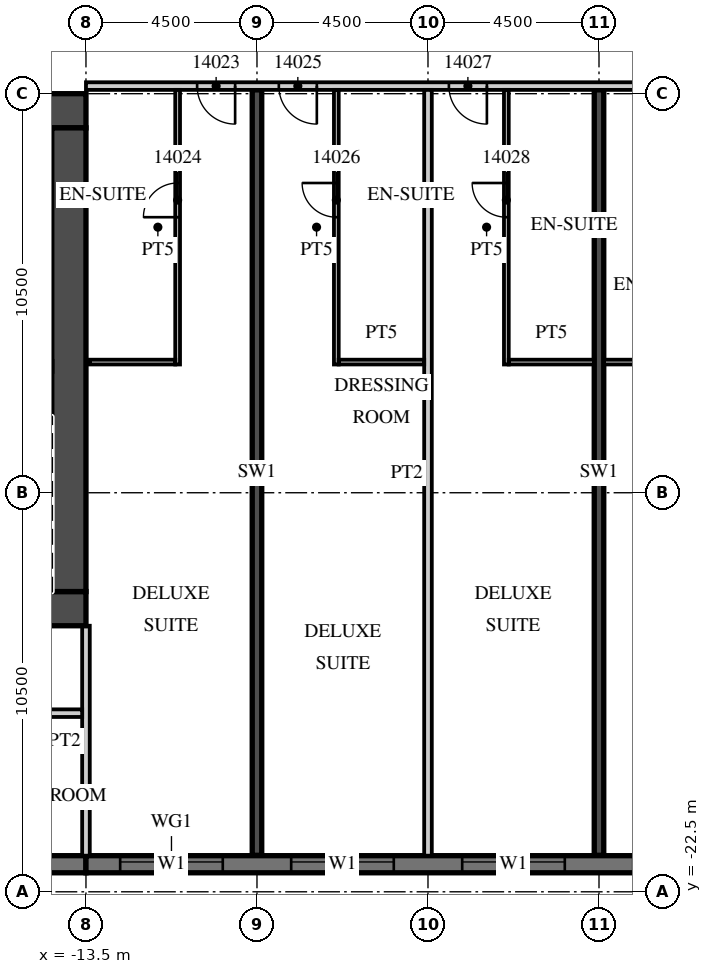
"""IFC4 building model, lengths in metres.
Left out: names, types, materials, properties, quantities, classifications, styles, units other than length and angle.
Written with IfcOpenShell. Run it as: python <this file> out.ifc"""

import sys

from ifc_helpers import new_model, si_unit, direction, frame, frame_2d, origin, place, context, subcontext, project, spatial, rectangle, extrude, element, fill, save


model = new_model("IFC4")
c1 = context("Model", 3, precision=1e-05, world=origin(), true_north=direction((0.0, 1.0)))
c2 = subcontext(c1, "Body", "Model", "MODEL_VIEW")
j1 = project(units=[si_unit("LENGTHUNIT", "METRE"), si_unit("PLANEANGLEUNIT", "RADIAN")], contexts=[c1])
p1 = place(None, origin())
s1 = spatial("IfcSite", under=j1, at=p1, CompositionType="ELEMENT")
p2 = place(p1, origin())
s2 = spatial("IfcBuilding", under=s1, at=p2, CompositionType="ELEMENT")
p3 = place(p2, frame((0.0, 0.0, 76.5)))
s3 = spatial("IfcBuildingStorey", under=s2, at=p3, CompositionType="ELEMENT", Elevation=76.5)
for number, where, z_axis, x_axis in (
    (1, (-9.0, -21.54, 0.0), (0.0, 0.0, 1.0), (0.0, 1.0, 0.0)),
    (2, (0.0, -21.54, 0.0), (0.0, 0.0, 1.0), (0.0, 1.0, 0.0)),
):
    element("IfcWall", number, at=place(p3, frame(where, z_axis=z_axis, x_axis=x_axis)), inside=s3, PredefinedType="SHEAR", context=c2, shape_type="SweptSolid", body=[
        extrude(rectangle(XDim=20.14, YDim=0.25, at=frame_2d((10.07, 0.0))), origin(), (0.0, 0.0, 1.0), 3.3),
    ])
p4 = place(p3, frame((-31.5, -21.775, 0.0), z_axis=(0.0, 0.0, 1.0), x_axis=(1.0, 0.0, 0.0)))
e3 = element("IfcWall", 3, at=p4, inside=s3, PredefinedType="SOLIDWALL", context=c2, shape_type="SweptSolid", body=[
    extrude(rectangle(XDim=18.0, YDim=0.45, at=frame_2d((9.0, 0.0))), origin(), (0.0, 0.0, 1.0), 3.02),
])
p5 = place(p3, frame((-13.5, -21.775, 0.0), z_axis=(0.0, 0.0, 1.0), x_axis=(1.0, 0.0, 0.0)))
e4 = element("IfcWall", 4, at=p5, inside=s3, PredefinedType="SOLIDWALL", context=c2, shape_type="SweptSolid", body=[
    extrude(rectangle(XDim=54.5, YDim=0.45, at=frame_2d((27.25, 0.0))), origin(), (0.0, 0.0, 1.0), 3.02),
])
p6 = place(p5, frame((0.9, 0.0, 0.45)))
e5 = element("IfcOpeningElement", 5, at=p6, cuts=e4, PredefinedType="OPENING", context=c2, shape_type="SweptSolid", body=[
    extrude(rectangle(XDim=2.7, YDim=2.25, at=frame_2d((1.35, 1.125))), frame((0.0, 0.235, 0.0), z_axis=(0.0, -1.0, 0.0), x_axis=(1.0, 0.0, 0.0)), (0.0, 0.0, 1.0), 0.47),
])
p7 = place(p5, frame((5.4, 0.0, 0.45)))
e6 = element("IfcOpeningElement", 6, at=p7, cuts=e4, PredefinedType="OPENING", context=c2, shape_type="SweptSolid", body=[
    extrude(rectangle(XDim=2.7, YDim=2.25, at=frame_2d((1.35, 1.125))), frame((0.0, 0.235, 0.0), z_axis=(0.0, -1.0, 0.0), x_axis=(1.0, 0.0, 0.0)), (0.0, 0.0, 1.0), 0.47),
])
p8 = place(p5, frame((9.9, 0.0, 0.45)))
e7 = element("IfcOpeningElement", 7, at=p8, cuts=e4, PredefinedType="OPENING", context=c2, shape_type="SweptSolid", body=[
    extrude(rectangle(XDim=2.7, YDim=2.25, at=frame_2d((1.35, 1.125))), frame((0.0, 0.235, 0.0), z_axis=(0.0, -1.0, 0.0), x_axis=(1.0, 0.0, 0.0)), (0.0, 0.0, 1.0), 0.47),
])
p9 = place(p5, frame((14.4, 0.0, 0.45)))
e8 = element("IfcOpeningElement", 8, at=p9, cuts=e4, PredefinedType="OPENING", context=c2, shape_type="SweptSolid", body=[
    extrude(rectangle(XDim=2.7, YDim=2.25, at=frame_2d((1.35, 1.125))), frame((0.0, 0.235, 0.0), z_axis=(0.0, -1.0, 0.0), x_axis=(1.0, 0.0, 0.0)), (0.0, 0.0, 1.0), 0.47),
])
p10 = place(p5, frame((18.9, 0.0, 0.45)))
e9 = element("IfcOpeningElement", 9, at=p10, cuts=e4, PredefinedType="OPENING", context=c2, shape_type="SweptSolid", body=[
    extrude(rectangle(XDim=2.7, YDim=2.25, at=frame_2d((1.35, 1.125))), frame((0.0, 0.235, 0.0), z_axis=(0.0, -1.0, 0.0), x_axis=(1.0, 0.0, 0.0)), (0.0, 0.0, 1.0), 0.47),
])
p11 = place(p5, frame((23.4, 0.0, 0.45)))
e10 = element("IfcOpeningElement", 10, at=p11, cuts=e4, PredefinedType="OPENING", context=c2, shape_type="SweptSolid", body=[
    extrude(rectangle(XDim=2.7, YDim=2.25, at=frame_2d((1.35, 1.125))), frame((0.0, 0.235, 0.0), z_axis=(0.0, -1.0, 0.0), x_axis=(1.0, 0.0, 0.0)), (0.0, 0.0, 1.0), 0.47),
])
p12 = place(p5, frame((27.9, 0.0, 0.45)))
e11 = element("IfcOpeningElement", 11, at=p12, cuts=e4, PredefinedType="OPENING", context=c2, shape_type="SweptSolid", body=[
    extrude(rectangle(XDim=2.7, YDim=2.25, at=frame_2d((1.35, 1.125))), frame((0.0, 0.235, 0.0), z_axis=(0.0, -1.0, 0.0), x_axis=(1.0, 0.0, 0.0)), (0.0, 0.0, 1.0), 0.47),
])
p13 = place(p5, frame((32.4, 0.0, 0.45)))
e12 = element("IfcOpeningElement", 12, at=p13, cuts=e4, PredefinedType="OPENING", context=c2, shape_type="SweptSolid", body=[
    extrude(rectangle(XDim=2.7, YDim=2.25, at=frame_2d((1.35, 1.125))), frame((0.0, 0.235, 0.0), z_axis=(0.0, -1.0, 0.0), x_axis=(1.0, 0.0, 0.0)), (0.0, 0.0, 1.0), 0.47),
])
p14 = place(p5, frame((36.9, 0.0, 0.45)))
e13 = element("IfcOpeningElement", 13, at=p14, cuts=e4, PredefinedType="OPENING", context=c2, shape_type="SweptSolid", body=[
    extrude(rectangle(XDim=2.7, YDim=2.25, at=frame_2d((1.35, 1.125))), frame((0.0, 0.235, 0.0), z_axis=(0.0, -1.0, 0.0), x_axis=(1.0, 0.0, 0.0)), (0.0, 0.0, 1.0), 0.47),
])
p15 = place(p5, frame((41.4, 0.0, 0.45)))
e14 = element("IfcOpeningElement", 14, at=p15, cuts=e4, PredefinedType="OPENING", context=c2, shape_type="SweptSolid", body=[
    extrude(rectangle(XDim=2.7, YDim=2.25, at=frame_2d((1.35, 1.125))), frame((0.0, 0.235, 0.0), z_axis=(0.0, -1.0, 0.0), x_axis=(1.0, 0.0, 0.0)), (0.0, 0.0, 1.0), 0.47),
])
p16 = place(p5, frame((45.9, 0.0, 0.45)))
e15 = element("IfcOpeningElement", 15, at=p16, cuts=e4, PredefinedType="OPENING", context=c2, shape_type="SweptSolid", body=[
    extrude(rectangle(XDim=2.7, YDim=2.25, at=frame_2d((1.35, 1.125))), frame((0.0, 0.235, 0.0), z_axis=(0.0, -1.0, 0.0), x_axis=(1.0, 0.0, 0.0)), (0.0, 0.0, 1.0), 0.47),
])
p17 = place(p5, frame((50.4, 0.0, 0.45)))
e16 = element("IfcOpeningElement", 16, at=p17, cuts=e4, PredefinedType="OPENING", context=c2, shape_type="SweptSolid", body=[
    extrude(rectangle(XDim=2.7, YDim=2.25, at=frame_2d((1.35, 1.125))), frame((0.0, 0.235, 0.0), z_axis=(0.0, -1.0, 0.0), x_axis=(1.0, 0.0, 0.0)), (0.0, 0.0, 1.0), 0.47),
])
p18 = place(p3, frame((-13.5, -21.55, 0.0), z_axis=(0.0, 0.0, 1.0), x_axis=(0.0, 1.0, 0.0)))
e17 = element("IfcWall", 17, at=p18, inside=s3, PredefinedType="PARTITIONING", context=c2, shape_type="SweptSolid", body=[
    extrude(rectangle(XDim=6.05, YDim=0.2, at=frame_2d((3.025, 0.0))), origin(), (0.0, 0.0, 1.0), 3.02),
])
p19 = place(p3, frame((-13.5, -1.3, 0.0), z_axis=(0.0, 0.0, 1.0), x_axis=(1.0, 0.0, 0.0)))
e18 = element("IfcWall", 18, at=p19, inside=s3, PredefinedType="PARTITIONING", context=c2, shape_type="SweptSolid", body=[
    extrude(rectangle(XDim=58.05, YDim=0.2, at=frame_2d((29.025, 0.0))), origin(), (0.0, 0.0, 1.0), 3.02),
])
p20 = place(p19, frame((2.925, 0.0, 0.0)))
e19 = element("IfcOpeningElement", 19, at=p20, cuts=e18, PredefinedType="OPENING", context=c2, shape_type="SweptSolid", body=[
    extrude(rectangle(XDim=1.0, YDim=2.1, at=frame_2d((0.5, 1.05))), frame((0.0, 0.11, 0.0), z_axis=(0.0, -1.0, 0.0), x_axis=(1.0, 0.0, 0.0)), (0.0, 0.0, 1.0), 0.22),
])
p21 = place(p19, frame((5.075, 0.0, 0.0)))
e20 = element("IfcOpeningElement", 20, at=p21, cuts=e18, PredefinedType="OPENING", context=c2, shape_type="SweptSolid", body=[
    extrude(rectangle(XDim=1.0, YDim=2.1, at=frame_2d((0.5, 1.05))), frame((0.0, 0.11, 0.0), z_axis=(0.0, -1.0, 0.0), x_axis=(1.0, 0.0, 0.0)), (0.0, 0.0, 1.0), 0.22),
])
p22 = place(p19, frame((9.55, 0.0, 0.0)))
e21 = element("IfcOpeningElement", 21, at=p22, cuts=e18, PredefinedType="OPENING", context=c2, shape_type="SweptSolid", body=[
    extrude(rectangle(XDim=1.0, YDim=2.1, at=frame_2d((0.5, 1.05))), frame((0.0, 0.11, 0.0), z_axis=(0.0, -1.0, 0.0), x_axis=(1.0, 0.0, 0.0)), (0.0, 0.0, 1.0), 0.22),
])
p23 = place(p19, frame((18.862, 0.0, 0.0)))
e22 = element("IfcOpeningElement", 22, at=p23, cuts=e18, PredefinedType="OPENING", context=c2, shape_type="SweptSolid", body=[
    extrude(rectangle(XDim=1.2, YDim=2.1, at=frame_2d((0.6, 1.05))), frame((0.0, 0.11, 0.0), z_axis=(0.0, -1.0, 0.0), x_axis=(1.0, 0.0, 0.0)), (0.0, 0.0, 1.0), 0.22),
])
p24 = place(p19, frame((27.862, 0.0, 0.0)))
e23 = element("IfcOpeningElement", 23, at=p24, cuts=e18, PredefinedType="OPENING", context=c2, shape_type="SweptSolid", body=[
    extrude(rectangle(XDim=1.2, YDim=2.1, at=frame_2d((0.6, 1.05))), frame((0.0, 0.11, 0.0), z_axis=(0.0, -1.0, 0.0), x_axis=(1.0, 0.0, 0.0)), (0.0, 0.0, 1.0), 0.22),
])
p25 = place(p19, frame((34.45, 0.0, 0.0)))
e24 = element("IfcOpeningElement", 24, at=p25, cuts=e18, PredefinedType="OPENING", context=c2, shape_type="SweptSolid", body=[
    extrude(rectangle(XDim=1.0, YDim=2.1, at=frame_2d((0.5, 1.05))), frame((0.0, 0.11, 0.0), z_axis=(0.0, -1.0, 0.0), x_axis=(1.0, 0.0, 0.0)), (0.0, 0.0, 1.0), 0.22),
])
p26 = place(p19, frame((38.925, 0.0, 0.0)))
e25 = element("IfcOpeningElement", 25, at=p26, cuts=e18, PredefinedType="OPENING", context=c2, shape_type="SweptSolid", body=[
    extrude(rectangle(XDim=1.0, YDim=2.1, at=frame_2d((0.5, 1.05))), frame((0.0, 0.11, 0.0), z_axis=(0.0, -1.0, 0.0), x_axis=(1.0, 0.0, 0.0)), (0.0, 0.0, 1.0), 0.22),
])
p27 = place(p19, frame((45.862, 0.0, 0.0)))
e26 = element("IfcOpeningElement", 26, at=p27, cuts=e18, PredefinedType="OPENING", context=c2, shape_type="SweptSolid", body=[
    extrude(rectangle(XDim=1.2, YDim=2.1, at=frame_2d((0.6, 1.05))), frame((0.0, 0.11, 0.0), z_axis=(0.0, -1.0, 0.0), x_axis=(1.0, 0.0, 0.0)), (0.0, 0.0, 1.0), 0.22),
])
p28 = place(p19, frame((50.075, 0.0, 0.0)))
e27 = element("IfcOpeningElement", 27, at=p28, cuts=e18, PredefinedType="OPENING", context=c2, shape_type="SweptSolid", body=[
    extrude(rectangle(XDim=1.0, YDim=2.1, at=frame_2d((0.5, 1.05))), frame((0.0, 0.11, 0.0), z_axis=(0.0, -1.0, 0.0), x_axis=(1.0, 0.0, 0.0)), (0.0, 0.0, 1.0), 0.22),
])
p29 = place(p19, frame((56.525, 0.0, 0.0)))
e28 = element("IfcOpeningElement", 28, at=p29, cuts=e18, PredefinedType="OPENING", context=c2, shape_type="SweptSolid", body=[
    extrude(rectangle(XDim=1.0, YDim=2.1, at=frame_2d((0.5, 1.05))), frame((0.0, 0.11, 0.0), z_axis=(0.0, -1.0, 0.0), x_axis=(1.0, 0.0, 0.0)), (0.0, 0.0, 1.0), 0.22),
])
p30 = place(p3, frame((-11.088, -8.625, 0.0), z_axis=(0.0, 0.0, 1.0), x_axis=(0.0, 1.0, 0.0)))
e29 = element("IfcWall", 29, at=p30, inside=s3, PredefinedType="PARTITIONING", context=c2, shape_type="SweptSolid", body=[
    extrude(rectangle(XDim=7.225, YDim=0.125, at=frame_2d((3.613, 0.0))), origin(), (0.0, 0.0, 1.0), 3.02),
])
p31 = place(p30, frame((3.875, 0.0, 0.0)))
e30 = element("IfcOpeningElement", 30, at=p31, cuts=e29, PredefinedType="OPENING", context=c2, shape_type="SweptSolid", body=[
    extrude(rectangle(XDim=0.9, YDim=2.1, at=frame_2d((0.45, 1.05))), frame((0.0, 0.073, 0.0), z_axis=(0.0, -1.0, 0.0), x_axis=(1.0, 0.0, 0.0)), (0.0, 0.0, 1.0), 0.145),
])
p32 = place(p3, frame((-13.4, -8.562, 0.0), z_axis=(0.0, 0.0, 1.0), x_axis=(1.0, 0.0, 0.0)))
e31 = element("IfcWall", 31, at=p32, inside=s3, PredefinedType="PARTITIONING", context=c2, shape_type="SweptSolid", body=[
    extrude(rectangle(XDim=2.25, YDim=0.125, at=frame_2d((1.125, 0.0))), origin(), (0.0, 0.0, 1.0), 3.02),
])
p33 = place(p3, frame((-4.5, -21.55, 0.0), z_axis=(0.0, 0.0, 1.0), x_axis=(0.0, 1.0, 0.0)))
e32 = element("IfcWall", 32, at=p33, inside=s3, PredefinedType="PARTITIONING", context=c2, shape_type="SweptSolid", body=[
    extrude(rectangle(XDim=20.15, YDim=0.2, at=frame_2d((10.075, 0.0))), origin(), (0.0, 0.0, 1.0), 3.02),
])
p34 = place(p3, frame((-6.912, -8.625, 0.0), z_axis=(0.0, 0.0, 1.0), x_axis=(0.0, 1.0, 0.0)))
e33 = element("IfcWall", 33, at=p34, inside=s3, PredefinedType="PARTITIONING", context=c2, shape_type="SweptSolid", body=[
    extrude(rectangle(XDim=7.225, YDim=0.125, at=frame_2d((3.613, 0.0))), origin(), (0.0, 0.0, 1.0), 3.02),
])
p35 = place(p34, frame((3.875, 0.0, 0.0)))
e34 = element("IfcOpeningElement", 34, at=p35, cuts=e33, PredefinedType="OPENING", context=c2, shape_type="SweptSolid", body=[
    extrude(rectangle(XDim=0.9, YDim=2.1, at=frame_2d((0.45, 1.05))), frame((0.0, 0.073, 0.0), z_axis=(0.0, -1.0, 0.0), x_axis=(1.0, 0.0, 0.0)), (0.0, 0.0, 1.0), 0.145),
])
p36 = place(p3, frame((-6.85, -8.562, 0.0), z_axis=(0.0, 0.0, 1.0), x_axis=(1.0, 0.0, 0.0)))
e35 = element("IfcWall", 35, at=p36, inside=s3, PredefinedType="PARTITIONING", context=c2, shape_type="SweptSolid", body=[
    extrude(rectangle(XDim=2.25, YDim=0.125, at=frame_2d((1.125, 0.0))), origin(), (0.0, 0.0, 1.0), 3.02),
])
p37 = place(p3, frame((-2.438, -8.625, 0.0), z_axis=(0.0, 0.0, 1.0), x_axis=(0.0, 1.0, 0.0)))
e36 = element("IfcWall", 36, at=p37, inside=s3, PredefinedType="PARTITIONING", context=c2, shape_type="SweptSolid", body=[
    extrude(rectangle(XDim=7.225, YDim=0.125, at=frame_2d((3.613, 0.0))), origin(), (0.0, 0.0, 1.0), 3.02),
])
p38 = place(p37, frame((3.875, 0.0, 0.0)))
e37 = element("IfcOpeningElement", 37, at=p38, cuts=e36, PredefinedType="OPENING", context=c2, shape_type="SweptSolid", body=[
    extrude(rectangle(XDim=0.9, YDim=2.1, at=frame_2d((0.45, 1.05))), frame((0.0, 0.073, 0.0), z_axis=(0.0, -1.0, 0.0), x_axis=(1.0, 0.0, 0.0)), (0.0, 0.0, 1.0), 0.145),
])
p39 = place(p3, frame((-2.375, -8.562, 0.0), z_axis=(0.0, 0.0, 1.0), x_axis=(1.0, 0.0, 0.0)))
e38 = element("IfcWall", 38, at=p39, inside=s3, PredefinedType="PARTITIONING", context=c2, shape_type="SweptSolid", body=[
    extrude(rectangle(XDim=2.25, YDim=0.125, at=frame_2d((1.125, 0.0))), origin(), (0.0, 0.0, 1.0), 3.02),
])
p40 = place(p3, frame((0.125, -8.562, 0.0), z_axis=(0.0, 0.0, 1.0), x_axis=(1.0, 0.0, 0.0)))
e39 = element("IfcWall", 39, at=p40, inside=s3, PredefinedType="PARTITIONING", context=c2, shape_type="SweptSolid", body=[
    extrude(rectangle(XDim=2.8, YDim=0.125, at=frame_2d((1.4, 0.0))), origin(), (0.0, 0.0, 1.0), 3.02),
])
p41 = place(p3, frame((-31.5, -1.95, 0.0), z_axis=(0.0, 0.0, 1.0), x_axis=(1.0, 0.0, 0.0)))
e40 = element("IfcWall", 40, at=p41, inside=s3, PredefinedType="SHEAR", context=c2, shape_type="SweptSolid", body=[
    extrude(rectangle(XDim=18.0, YDim=0.9, at=frame_2d((9.0, 0.0))), origin(), (0.0, 0.0, 1.0), 3.02),
])
p42 = place(p41, frame((14.725, 0.0, 0.0)))
e41 = element("IfcOpeningElement", 41, at=p42, cuts=e40, PredefinedType="OPENING", context=c2, shape_type="SweptSolid", body=[
    extrude(rectangle(XDim=1.8, YDim=2.1, at=frame_2d((0.9, 1.05))), frame((0.0, 0.46, 0.0), z_axis=(0.0, -1.0, 0.0), x_axis=(1.0, 0.0, 0.0)), (0.0, 0.0, 1.0), 0.92),
])
p43 = place(p3, frame((-20.3, -15.05, 0.0), z_axis=(0.0, 0.0, 1.0), x_axis=(1.0, 0.0, 0.0)))
e42 = element("IfcWall", 42, at=p43, inside=s3, PredefinedType="SHEAR", context=c2, shape_type="SweptSolid", body=[
    extrude(rectangle(XDim=6.8, YDim=0.9, at=frame_2d((3.4, 0.0))), origin(), (0.0, 0.0, 1.0), 3.02),
])
p44 = place(p43, frame((0.875, 0.0, 0.0)))
e43 = element("IfcOpeningElement", 43, at=p44, cuts=e42, PredefinedType="OPENING", context=c2, shape_type="SweptSolid", body=[
    extrude(rectangle(XDim=1.2, YDim=2.1, at=frame_2d((0.6, 1.05))), frame((0.0, 0.46, 0.0), z_axis=(0.0, -1.0, 0.0), x_axis=(1.0, 0.0, 0.0)), (0.0, 0.0, 1.0), 0.92),
])
p45 = place(p3, frame((-13.95, -14.6, 0.0), z_axis=(0.0, 0.0, 1.0), x_axis=(0.0, 1.0, 0.0)))
e44 = element("IfcWall", 44, at=p45, inside=s3, PredefinedType="SHEAR", context=c2, shape_type="SweptSolid", body=[
    extrude(rectangle(XDim=12.2, YDim=0.9, at=frame_2d((6.1, 0.0))), origin(), (0.0, 0.0, 1.0), 3.02),
])
p46 = place(p3, frame((-44.55, -17.8, 0.0), z_axis=(0.0, 0.0, 1.0), x_axis=(1.0, 0.0, 0.0)))
e45 = element("IfcWall", 45, at=p46, inside=s3, PredefinedType="PARTITIONING", context=c2, shape_type="SweptSolid", body=[
    extrude(rectangle(XDim=30.95, YDim=0.2, at=frame_2d((15.475, 0.0))), origin(), (0.0, 0.0, 1.0), 3.02),
])
p47 = place(p46, frame((12.238, 0.0, 0.0)))
e46 = element("IfcOpeningElement", 46, at=p47, cuts=e45, PredefinedType="OPENING", context=c2, shape_type="SweptSolid", body=[
    extrude(rectangle(XDim=0.9, YDim=2.1, at=frame_2d((0.45, 1.05))), frame((0.0, 0.11, 0.0), z_axis=(0.0, -1.0, 0.0), x_axis=(1.0, 0.0, 0.0)), (0.0, 0.0, 1.0), 0.22),
])
p48 = place(p46, frame((20.538, 0.0, 0.0)))
e47 = element("IfcOpeningElement", 47, at=p48, cuts=e45, PredefinedType="OPENING", context=c2, shape_type="SweptSolid", body=[
    extrude(rectangle(XDim=0.9, YDim=2.1, at=frame_2d((0.45, 1.05))), frame((0.0, 0.11, 0.0), z_axis=(0.0, -1.0, 0.0), x_axis=(1.0, 0.0, 0.0)), (0.0, 0.0, 1.0), 0.22),
])
p49 = place(p6, origin())
e48 = element("IfcWindow", 48, at=p49, inside=s3, PartitioningType="SINGLE_PANEL", PredefinedType="WINDOW", context=c2, shape_type="SweptSolid", body=[
    extrude(rectangle(XDim=2.7, YDim=2.25, at=frame_2d((1.35, 1.125))), frame((0.0, 0.09, 0.0), z_axis=(0.0, -1.0, 0.0), x_axis=(1.0, 0.0, 0.0)), (0.0, 0.0, 1.0), 0.06),
])
fill(e5, e48)
p50 = place(p7, origin())
e49 = element("IfcWindow", 49, at=p50, inside=s3, PartitioningType="SINGLE_PANEL", PredefinedType="WINDOW", context=c2, shape_type="SweptSolid", body=[
    extrude(rectangle(XDim=2.7, YDim=2.25, at=frame_2d((1.35, 1.125))), frame((0.0, 0.09, 0.0), z_axis=(0.0, -1.0, 0.0), x_axis=(1.0, 0.0, 0.0)), (0.0, 0.0, 1.0), 0.06),
])
fill(e6, e49)
p51 = place(p8, origin())
e50 = element("IfcWindow", 50, at=p51, inside=s3, PartitioningType="SINGLE_PANEL", PredefinedType="WINDOW", context=c2, shape_type="SweptSolid", body=[
    extrude(rectangle(XDim=2.7, YDim=2.25, at=frame_2d((1.35, 1.125))), frame((0.0, 0.09, 0.0), z_axis=(0.0, -1.0, 0.0), x_axis=(1.0, 0.0, 0.0)), (0.0, 0.0, 1.0), 0.06),
])
fill(e7, e50)
p52 = place(p20, origin())
e51 = element("IfcDoor", 51, at=p52, inside=s3, OperationType="SINGLE_SWING_RIGHT", PredefinedType="DOOR", context=c2, shape_type="SweptSolid", body=[
    extrude(rectangle(XDim=1.0, YDim=2.1, at=frame_2d((0.5, 1.05))), frame((0.0, 0.025, 0.0), z_axis=(0.0, -1.0, 0.0), x_axis=(1.0, 0.0, 0.0)), (0.0, 0.0, 1.0), 0.05),
])
fill(e19, e51)
p53 = place(p31, origin())
e52 = element("IfcDoor", 52, at=p53, inside=s3, OperationType="SINGLE_SWING_LEFT", PredefinedType="DOOR", context=c2, shape_type="SweptSolid", body=[
    extrude(rectangle(XDim=0.9, YDim=2.1, at=frame_2d((0.45, 1.05))), frame((0.0, 0.025, 0.0), z_axis=(0.0, -1.0, 0.0), x_axis=(1.0, 0.0, 0.0)), (0.0, 0.0, 1.0), 0.05),
])
fill(e30, e52)
p54 = place(p21, origin())
e53 = element("IfcDoor", 53, at=p54, inside=s3, OperationType="SINGLE_SWING_RIGHT", PredefinedType="DOOR", context=c2, shape_type="SweptSolid", body=[
    extrude(rectangle(XDim=1.0, YDim=2.1, at=frame_2d((0.5, 1.05))), frame((0.0, 0.025, 0.0), z_axis=(0.0, -1.0, 0.0), x_axis=(1.0, 0.0, 0.0)), (0.0, 0.0, 1.0), 0.05),
])
fill(e20, e53)
p55 = place(p35, origin())
e54 = element("IfcDoor", 54, at=p55, inside=s3, OperationType="SINGLE_SWING_RIGHT", PredefinedType="DOOR", context=c2, shape_type="SweptSolid", body=[
    extrude(rectangle(XDim=0.9, YDim=2.1, at=frame_2d((0.45, 1.05))), frame((0.0, 0.025, 0.0), z_axis=(0.0, -1.0, 0.0), x_axis=(1.0, 0.0, 0.0)), (0.0, 0.0, 1.0), 0.05),
])
fill(e34, e54)
p56 = place(p22, origin())
e55 = element("IfcDoor", 55, at=p56, inside=s3, OperationType="SINGLE_SWING_RIGHT", PredefinedType="DOOR", context=c2, shape_type="SweptSolid", body=[
    extrude(rectangle(XDim=1.0, YDim=2.1, at=frame_2d((0.5, 1.05))), frame((0.0, 0.025, 0.0), z_axis=(0.0, -1.0, 0.0), x_axis=(1.0, 0.0, 0.0)), (0.0, 0.0, 1.0), 0.05),
])
fill(e21, e55)
p57 = place(p38, origin())
e56 = element("IfcDoor", 56, at=p57, inside=s3, OperationType="SINGLE_SWING_RIGHT", PredefinedType="DOOR", context=c2, shape_type="SweptSolid", body=[
    extrude(rectangle(XDim=0.9, YDim=2.1, at=frame_2d((0.45, 1.05))), frame((0.0, 0.025, 0.0), z_axis=(0.0, -1.0, 0.0), x_axis=(1.0, 0.0, 0.0)), (0.0, 0.0, 1.0), 0.05),
])
fill(e37, e56)
save(model, sys.argv[1])
